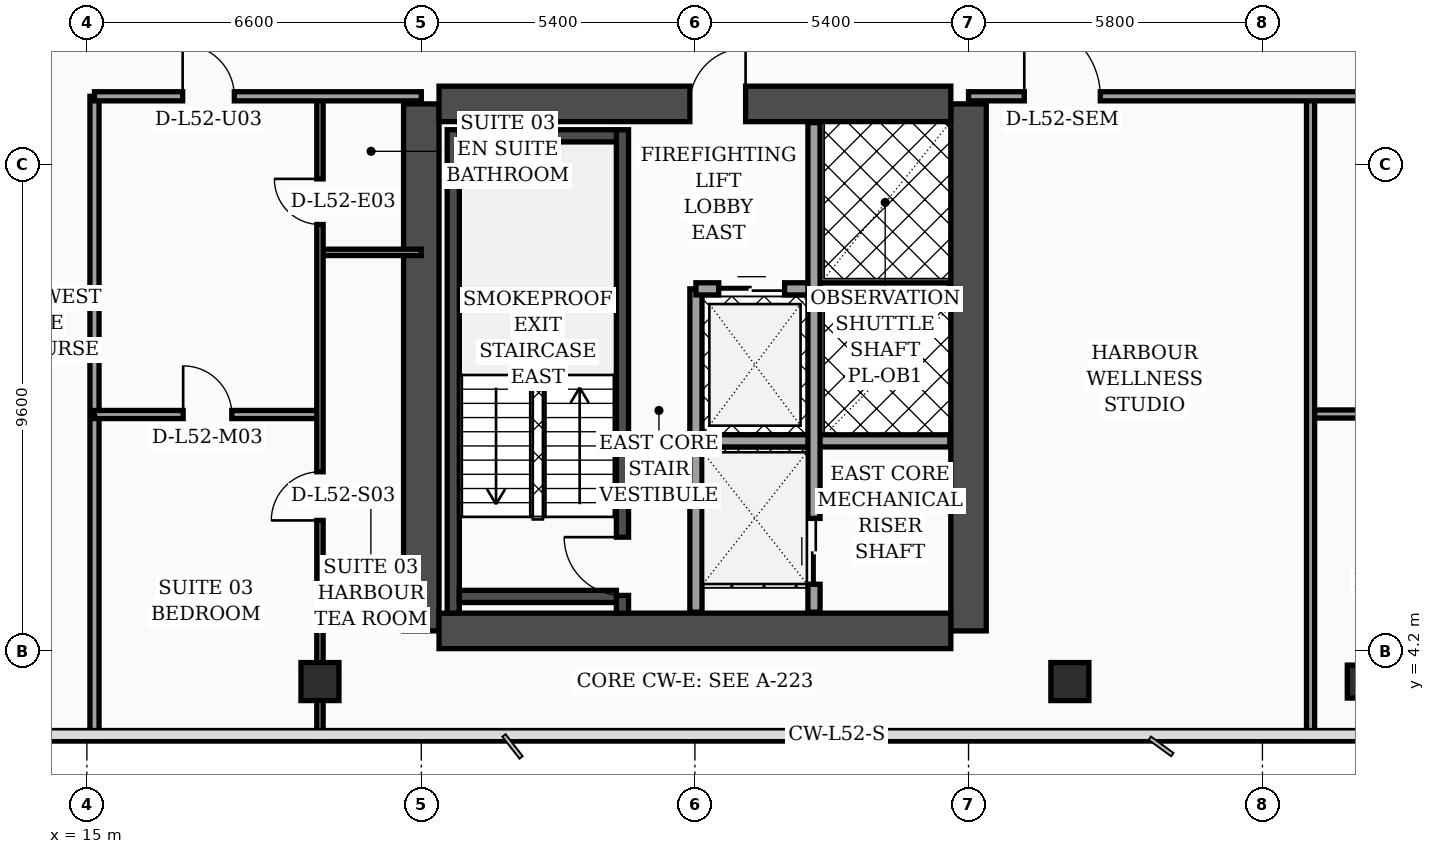
"""IFC4 building model, lengths in metres.
Left out: names, types, materials, properties, quantities, classifications, styles, units other than length and angle.
Written with IfcOpenShell. Run it as: python <this file> out.ifc"""

import sys

from ifc_helpers import new_model, si_unit, direction, frame, frame_2d, origin, origin_2d, place, context, subcontext, project, spatial, rectangle, hollow_rectangle, extrude, element, fill, save


model = new_model("IFC4")
c1 = context("Model", 3, precision=1e-05, world=origin(), true_north=direction((0.0, 1.0)))
c2 = subcontext(c1, "Body", "Model", "MODEL_VIEW")
j1 = project(units=[si_unit("LENGTHUNIT", "METRE"), si_unit("PLANEANGLEUNIT", "RADIAN")], contexts=[c1])
p1 = place(None, origin())
s1 = spatial("IfcSite", under=j1, at=p1, CompositionType="ELEMENT")
p2 = place(p1, origin())
s2 = spatial("IfcBuilding", under=s1, at=p2, CompositionType="ELEMENT")
p3 = place(p2, frame((0.0, 0.0, 211.0)))
s3 = spatial("IfcBuildingStorey", under=s2, at=p3, CompositionType="ELEMENT", Elevation=211.0)
for number, where, z_axis, x_axis in (
    (1, (21.6, 4.6, 0.0), (0.0, 0.0, 1.0), (0.0, 1.0, 0.0)),
    (2, (32.4, 4.6, 0.0), (0.0, 0.0, 1.0), (0.0, 1.0, 0.0)),
):
    element("IfcWall", number, at=place(p3, frame(where, z_axis=z_axis, x_axis=x_axis)), inside=s3, PredefinedType="SHEAR", context=c2, shape_type="SweptSolid", body=[
        extrude(rectangle(XDim=10.4, YDim=0.7, at=frame_2d((5.2, 0.0))), origin(), (0.0, 0.0, 1.0), 3.56),
    ])
p4 = place(p3, frame((21.95, 15.0, 0.0), z_axis=(0.0, 0.0, 1.0), x_axis=(1.0, 0.0, 0.0)))
e3 = element("IfcWall", 3, at=p4, inside=s3, PredefinedType="SHEAR", context=c2, shape_type="SweptSolid", body=[
    extrude(rectangle(XDim=10.1, YDim=0.7, at=frame_2d((5.05, 0.0))), origin(), (0.0, 0.0, 1.0), 3.56),
])
p5 = place(p4, frame((4.95, 0.0, 0.0)))
e4 = element("IfcOpeningElement", 4, at=p5, cuts=e3, PredefinedType="OPENING", context=c2, shape_type="SweptSolid", body=[
    extrude(rectangle(XDim=1.1, YDim=2.2, at=frame_2d((0.55, 1.1))), frame((0.0, 0.36, 0.0), z_axis=(0.0, -1.0, 0.0), x_axis=(1.0, 0.0, 0.0)), (0.0, 0.0, 1.0), 0.72),
])
p6 = place(p3, frame((21.95, 4.6, 0.0), z_axis=(0.0, 0.0, 1.0), x_axis=(1.0, 0.0, 0.0)))
e5 = element("IfcWall", 5, at=p6, inside=s3, PredefinedType="SHEAR", context=c2, shape_type="SweptSolid", body=[
    extrude(rectangle(XDim=10.1, YDim=0.7, at=frame_2d((5.05, 0.0))), origin(), (0.0, 0.0, 1.0), 3.56),
])
p7 = place(p3, frame((22.23, 4.95, 0.0), z_axis=(0.0, 0.0, 1.0), x_axis=(0.0, 1.0, 0.0)))
e6 = element("IfcWall", 6, at=p7, inside=s3, PredefinedType="SOLIDWALL", context=c2, shape_type="SweptSolid", body=[
    extrude(rectangle(XDim=9.54, YDim=0.24, at=frame_2d((4.77, 0.0))), origin(), (0.0, 0.0, 1.0), 3.56),
])
p8 = place(p3, frame((25.57, 4.95, 0.0), z_axis=(0.0, 0.0, 1.0), x_axis=(0.0, 1.0, 0.0)))
e7 = element("IfcWall", 7, at=p8, inside=s3, PredefinedType="SOLIDWALL", context=c2, shape_type="SweptSolid", body=[
    extrude(rectangle(XDim=9.54, YDim=0.24, at=frame_2d((4.77, 0.0))), origin(), (0.0, 0.0, 1.0), 3.56),
])
p9 = place(p8, frame((0.35, 0.0, 0.0)))
e8 = element("IfcOpeningElement", 8, at=p9, cuts=e7, PredefinedType="OPENING", context=c2, shape_type="SweptSolid", body=[
    extrude(rectangle(XDim=1.15, YDim=2.2, at=frame_2d((0.575, 1.1))), frame((0.0, 0.13, 0.0), z_axis=(0.0, -1.0, 0.0), x_axis=(1.0, 0.0, 0.0)), (0.0, 0.0, 1.0), 0.26),
])
for number, where, z_axis, x_axis in (
    (9, (22.35, 5.28, 0.0), (0.0, 0.0, 1.0), (1.0, 0.0, 0.0)),
    (10, (22.35, 14.37, 0.0), (0.0, 0.0, 1.0), (1.0, 0.0, 0.0)),
):
    element("IfcWall", number, at=place(p3, frame(where, z_axis=z_axis, x_axis=x_axis)), inside=s3, PredefinedType="SOLIDWALL", context=c2, shape_type="SweptSolid", body=[
        extrude(rectangle(XDim=3.1, YDim=0.24, at=frame_2d((1.55, 0.0))), origin(), (0.0, 0.0, 1.0), 3.56),
    ])
for number, where, z_axis, x_axis in (
    (11, (19.6, 3.6, 0.0), (0.0, 0.0, 1.0), (1.0, 0.0, 0.0)),
    (12, (34.4, 3.6, 0.0), (0.0, 0.0, 1.0), (1.0, 0.0, 0.0)),
):
    element("IfcColumn", number, at=place(p3, frame(where, z_axis=z_axis, x_axis=x_axis)), inside=s3, PredefinedType="COLUMN", context=c2, shape_type="SweptSolid", body=[
        extrude(hollow_rectangle(XDim=0.75, YDim=0.75, WallThickness=0.032, at=origin_2d()), origin(), (0.0, 0.0, 1.0), 3.56),
    ])
p10 = place(p3, frame((40.2, 3.6, 0.0), z_axis=(0.0, 0.0, 1.0), x_axis=(1.0, 0.0, 0.0)))
e13 = element("IfcColumn", 13, at=p10, inside=s3, PredefinedType="COLUMN", context=c2, shape_type="SweptSolid", body=[
    extrude(hollow_rectangle(XDim=0.65, YDim=0.65, WallThickness=0.028, at=origin_2d()), origin(), (0.0, 0.0, 1.0), 3.56),
])
p11 = place(p3, frame((27.02, 4.97, 0.0), z_axis=(0.0, 0.0, 1.0), x_axis=(0.0, 1.0, 0.0)))
e14 = element("IfcWall", 14, at=p11, inside=s3, PredefinedType="SOLIDWALL", context=c2, shape_type="SweptSolid", body=[
    extrude(rectangle(XDim=6.38, YDim=0.24, at=frame_2d((3.19, 0.0))), origin(), (0.0, 0.0, 1.0), 3.56),
])
p12 = place(p3, frame((27.02, 11.35, 0.0), z_axis=(0.0, 0.0, 1.0), x_axis=(1.0, 0.0, 0.0)))
e15 = element("IfcWall", 15, at=p12, inside=s3, PredefinedType="SOLIDWALL", context=c2, shape_type="SweptSolid", body=[
    extrude(rectangle(XDim=5.01, YDim=0.24, at=frame_2d((2.505, 0.0))), origin(), (0.0, 0.0, 1.0), 3.56),
])
p13 = place(p12, frame((0.45, 0.0, 0.0)))
e16 = element("IfcOpeningElement", 16, at=p13, cuts=e15, PredefinedType="OPENING", context=c2, shape_type="SweptSolid", body=[
    extrude(rectangle(XDim=1.3, YDim=2.35, at=frame_2d((0.65, 1.175))), frame((0.0, 0.13, 0.0), z_axis=(0.0, -1.0, 0.0), x_axis=(1.0, 0.0, 0.0)), (0.0, 0.0, 1.0), 0.26),
])
p14 = place(p3, frame((27.02, 8.35, 0.0), z_axis=(0.0, 0.0, 1.0), x_axis=(1.0, 0.0, 0.0)))
e17 = element("IfcWall", 17, at=p14, inside=s3, PredefinedType="SOLIDWALL", context=c2, shape_type="SweptSolid", body=[
    extrude(rectangle(XDim=5.01, YDim=0.24, at=frame_2d((2.505, 0.0))), origin(), (0.0, 0.0, 1.0), 3.09),
])
p15 = place(p3, frame((29.35, 4.97, 0.0), z_axis=(0.0, 0.0, 1.0), x_axis=(0.0, 1.0, 0.0)))
e18 = element("IfcWall", 18, at=p15, inside=s3, PredefinedType="SOLIDWALL", context=c2, shape_type="SweptSolid", body=[
    extrude(rectangle(XDim=9.66, YDim=0.24, at=frame_2d((4.83, 0.0))), origin(), (0.0, 0.0, 1.0), 3.56),
])
p16 = place(p15, frame((0.55, 0.0, 0.0)))
e19 = element("IfcOpeningElement", 19, at=p16, cuts=e18, PredefinedType="OPENING", context=c2, shape_type="SweptSolid", body=[
    extrude(rectangle(XDim=1.3, YDim=2.35, at=frame_2d((0.65, 1.175))), frame((0.0, 0.13, 0.0), z_axis=(0.0, -1.0, 0.0), x_axis=(1.0, 0.0, 0.0)), (0.0, 0.0, 1.0), 0.26),
])
p17 = place(p3, frame((15.15, 2.44, 0.0), z_axis=(0.0, 0.0, 1.0), x_axis=(0.0, 1.0, 0.0)))
e20 = element("IfcWall", 20, at=p17, inside=s3, PredefinedType="PARTITIONING", context=c2, shape_type="SweptSolid", body=[
    extrude(rectangle(XDim=12.71, YDim=0.18, at=frame_2d((6.355, 0.0))), origin(), (0.0, 0.0, 1.0), 3.09),
])
p18 = place(p3, frame((19.6, 12.07, 0.0), z_axis=(0.0, 0.0, 1.0), x_axis=(1.0, 0.0, 0.0)))
e21 = element("IfcWall", 21, at=p18, inside=s3, PredefinedType="PARTITIONING", context=c2, shape_type="SweptSolid", body=[
    extrude(rectangle(XDim=2.0, YDim=0.125, at=frame_2d((1.0, 0.0))), origin(), (0.0, 0.0, 1.0), 3.56),
])
p19 = place(p3, frame((15.15, 8.87, 0.0), z_axis=(0.0, 0.0, 1.0), x_axis=(1.0, 0.0, 0.0)))
e22 = element("IfcWall", 22, at=p19, inside=s3, PredefinedType="PARTITIONING", context=c2, shape_type="SweptSolid", body=[
    extrude(rectangle(XDim=4.45, YDim=0.16, at=frame_2d((2.225, 0.0))), origin(), (0.0, 0.0, 1.0), 3.56),
])
p20 = place(p19, frame((1.75, 0.0, 0.0)))
e23 = element("IfcOpeningElement", 23, at=p20, cuts=e22, PredefinedType="OPENING", context=c2, shape_type="SweptSolid", body=[
    extrude(rectangle(XDim=0.96, YDim=2.2, at=frame_2d((0.48, 1.1))), frame((0.0, 0.09, 0.0), z_axis=(0.0, -1.0, 0.0), x_axis=(1.0, 0.0, 0.0)), (0.0, 0.0, 1.0), 0.18),
])
p21 = place(p3, frame((19.6, 2.44, 0.0), z_axis=(0.0, 0.0, 1.0), x_axis=(0.0, 1.0, 0.0)))
e24 = element("IfcWall", 24, at=p21, inside=s3, PredefinedType="PARTITIONING", context=c2, shape_type="SweptSolid", body=[
    extrude(rectangle(XDim=12.71, YDim=0.125, at=frame_2d((6.355, 0.0))), origin(), (0.0, 0.0, 1.0), 2.59),
])
p22 = place(p21, frame((4.34, 0.0, 0.0)))
e25 = element("IfcOpeningElement", 25, at=p22, cuts=e24, PredefinedType="OPENING", context=c2, shape_type="SweptSolid", body=[
    extrude(rectangle(XDim=0.96, YDim=2.2, at=frame_2d((0.48, 1.1))), frame((0.0, 0.073, 0.0), z_axis=(0.0, -1.0, 0.0), x_axis=(1.0, 0.0, 0.0)), (0.0, 0.0, 1.0), 0.145),
])
p23 = place(p21, frame((10.18, 0.0, 0.0)))
e26 = element("IfcOpeningElement", 26, at=p23, cuts=e24, PredefinedType="OPENING", context=c2, shape_type="SweptSolid", body=[
    extrude(rectangle(XDim=0.9, YDim=2.15, at=frame_2d((0.45, 1.075))), frame((0.0, 0.073, 0.0), z_axis=(0.0, -1.0, 0.0), x_axis=(1.0, 0.0, 0.0)), (0.0, 0.0, 1.0), 0.145),
])
p24 = place(p3, frame((15.15, 15.15, 0.0), z_axis=(0.0, 0.0, 1.0), x_axis=(1.0, 0.0, 0.0)))
e27 = element("IfcWall", 27, at=p24, inside=s3, PredefinedType="PARTITIONING", context=c2, shape_type="SweptSolid", body=[
    extrude(rectangle(XDim=6.45, YDim=0.18, at=frame_2d((3.225, 0.0))), origin(), (0.0, 0.0, 1.0), 2.59),
])
p25 = place(p24, frame((1.74, 0.0, 0.0)))
e28 = element("IfcOpeningElement", 28, at=p25, cuts=e27, PredefinedType="OPENING", context=c2, shape_type="SweptSolid", body=[
    extrude(rectangle(XDim=1.02, YDim=2.2, at=frame_2d((0.51, 1.1))), frame((0.0, 0.1, 0.0), z_axis=(0.0, -1.0, 0.0), x_axis=(1.0, 0.0, 0.0)), (0.0, 0.0, 1.0), 0.2),
])
p26 = place(p3, frame((39.15, 8.88, 0.0), z_axis=(0.0, 0.0, 1.0), x_axis=(1.0, 0.0, 0.0)))
e29 = element("IfcWall", 29, at=p26, inside=s3, PredefinedType="PARTITIONING", context=c2, shape_type="SweptSolid", body=[
    extrude(rectangle(XDim=4.52, YDim=0.16, at=frame_2d((2.26, 0.0))), origin(), (0.0, 0.0, 1.0), 3.09),
])
p27 = place(p26, frame((1.78, 0.0, 0.0)))
e30 = element("IfcOpeningElement", 30, at=p27, cuts=e29, PredefinedType="OPENING", context=c2, shape_type="SweptSolid", body=[
    extrude(rectangle(XDim=0.96, YDim=2.2, at=frame_2d((0.48, 1.1))), frame((0.0, 0.09, 0.0), z_axis=(0.0, -1.0, 0.0), x_axis=(1.0, 0.0, 0.0)), (0.0, 0.0, 1.0), 0.18),
])
p28 = place(p3, frame((39.15, 2.44, 0.0), z_axis=(0.0, 0.0, 1.0), x_axis=(0.0, 1.0, 0.0)))
e31 = element("IfcWall", 31, at=p28, inside=s3, PredefinedType="PARTITIONING", context=c2, shape_type="SweptSolid", body=[
    extrude(rectangle(XDim=12.71, YDim=0.16, at=frame_2d((6.355, 0.0))), origin(), (0.0, 0.0, 1.0), 2.94),
])
p29 = place(p3, frame((32.4, 15.15, 0.0), z_axis=(0.0, 0.0, 1.0), x_axis=(1.0, 0.0, 0.0)))
e32 = element("IfcWall", 32, at=p29, inside=s3, PredefinedType="PARTITIONING", context=c2, shape_type="SweptSolid", body=[
    extrude(rectangle(XDim=13.2, YDim=0.18, at=frame_2d((6.6, 0.0))), origin(), (0.0, 0.0, 1.0), 2.94),
])
p30 = place(p29, frame((1.1, 0.0, 0.0)))
e33 = element("IfcOpeningElement", 33, at=p30, cuts=e32, PredefinedType="OPENING", context=c2, shape_type="SweptSolid", body=[
    extrude(rectangle(XDim=1.5, YDim=2.22, at=frame_2d((0.75, 1.11))), frame((0.0, 0.1, 0.0), z_axis=(0.0, -1.0, 0.0), x_axis=(1.0, 0.0, 0.0)), (0.0, 0.0, 1.0), 0.2),
])
p31 = place(p29, frame((8.5, 0.0, 0.0)))
e34 = element("IfcOpeningElement", 34, at=p31, cuts=e32, PredefinedType="OPENING", context=c2, shape_type="SweptSolid", body=[
    extrude(rectangle(XDim=1.02, YDim=2.2, at=frame_2d((0.51, 1.1))), frame((0.0, 0.1, 0.0), z_axis=(0.0, -1.0, 0.0), x_axis=(1.0, 0.0, 0.0)), (0.0, 0.0, 1.0), 0.2),
])
p32 = place(p13, origin())
e35 = element("IfcDoor", 35, at=p32, inside=s3, OperationType="DOUBLE_DOOR_SLIDING", PredefinedType="DOOR", context=c2, shape_type="SweptSolid", body=[
    extrude(rectangle(XDim=1.3, YDim=2.35, at=frame_2d((0.65, 1.175))), frame((0.0, 0.025, 0.0), z_axis=(0.0, -1.0, 0.0), x_axis=(1.0, 0.0, 0.0)), (0.0, 0.0, 1.0), 0.05),
])
fill(e16, e35)
p33 = place(p16, origin())
e36 = element("IfcDoor", 36, at=p33, inside=s3, OperationType="DOUBLE_DOOR_SLIDING", PredefinedType="DOOR", context=c2, shape_type="SweptSolid", body=[
    extrude(rectangle(XDim=1.3, YDim=2.35, at=frame_2d((0.65, 1.175))), frame((0.0, 0.025, 0.0), z_axis=(0.0, -1.0, 0.0), x_axis=(1.0, 0.0, 0.0)), (0.0, 0.0, 1.0), 0.05),
])
fill(e19, e36)
p34 = place(p20, origin())
e37 = element("IfcDoor", 37, at=p34, inside=s3, OperationType="SINGLE_SWING_LEFT", PredefinedType="DOOR", context=c2, shape_type="SweptSolid", body=[
    extrude(rectangle(XDim=0.96, YDim=2.2, at=frame_2d((0.48, 1.1))), frame((0.0, 0.025, 0.0), z_axis=(0.0, -1.0, 0.0), x_axis=(1.0, 0.0, 0.0)), (0.0, 0.0, 1.0), 0.05),
])
fill(e23, e37)
p35 = place(p22, origin())
e38 = element("IfcDoor", 38, at=p35, inside=s3, OperationType="SINGLE_SWING_LEFT", PredefinedType="DOOR", context=c2, shape_type="SweptSolid", body=[
    extrude(rectangle(XDim=0.96, YDim=2.2, at=frame_2d((0.48, 1.1))), frame((0.0, 0.025, 0.0), z_axis=(0.0, -1.0, 0.0), x_axis=(1.0, 0.0, 0.0)), (0.0, 0.0, 1.0), 0.05),
])
fill(e25, e38)
p36 = place(p23, origin())
e39 = element("IfcDoor", 39, at=p36, inside=s3, OperationType="SINGLE_SWING_RIGHT", PredefinedType="DOOR", context=c2, shape_type="SweptSolid", body=[
    extrude(rectangle(XDim=0.9, YDim=2.15, at=frame_2d((0.45, 1.075))), frame((0.0, 0.025, 0.0), z_axis=(0.0, -1.0, 0.0), x_axis=(1.0, 0.0, 0.0)), (0.0, 0.0, 1.0), 0.05),
])
fill(e26, e39)
p37 = place(p25, origin())
e40 = element("IfcDoor", 40, at=p37, inside=s3, OperationType="SINGLE_SWING_LEFT", PredefinedType="DOOR", context=c2, shape_type="SweptSolid", body=[
    extrude(rectangle(XDim=1.02, YDim=2.2, at=frame_2d((0.51, 1.1))), frame((0.0, 0.025, 0.0), z_axis=(0.0, -1.0, 0.0), x_axis=(1.0, 0.0, 0.0)), (0.0, 0.0, 1.0), 0.05),
])
fill(e28, e40)
p38 = place(p30, origin())
e41 = element("IfcDoor", 41, at=p38, inside=s3, OperationType="SINGLE_SWING_LEFT", PredefinedType="DOOR", context=c2, shape_type="SweptSolid", body=[
    extrude(rectangle(XDim=1.5, YDim=2.22, at=frame_2d((0.75, 1.11))), frame((0.0, 0.025, 0.0), z_axis=(0.0, -1.0, 0.0), x_axis=(1.0, 0.0, 0.0)), (0.0, 0.0, 1.0), 0.05),
])
fill(e33, e41)
p39 = place(p9, origin())
e42 = element("IfcDoor", 42, at=p39, inside=s3, OperationType="SINGLE_SWING_RIGHT", PredefinedType="DOOR", context=c2, shape_type="SweptSolid", body=[
    extrude(rectangle(XDim=1.15, YDim=2.2, at=frame_2d((0.575, 1.1))), frame((0.0, 0.025, 0.0), z_axis=(0.0, -1.0, 0.0), x_axis=(1.0, 0.0, 0.0)), (0.0, 0.0, 1.0), 0.05),
])
fill(e8, e42)
p40 = place(p5, origin())
e43 = element("IfcDoor", 43, at=p40, inside=s3, OperationType="SINGLE_SWING_RIGHT", PredefinedType="DOOR", context=c2, shape_type="SweptSolid", body=[
    extrude(rectangle(XDim=1.1, YDim=2.2, at=frame_2d((0.55, 1.1))), frame((0.0, 0.025, 0.0), z_axis=(0.0, -1.0, 0.0), x_axis=(1.0, 0.0, 0.0)), (0.0, 0.0, 1.0), 0.05),
])
fill(e4, e43)
save(model, sys.argv[1])
